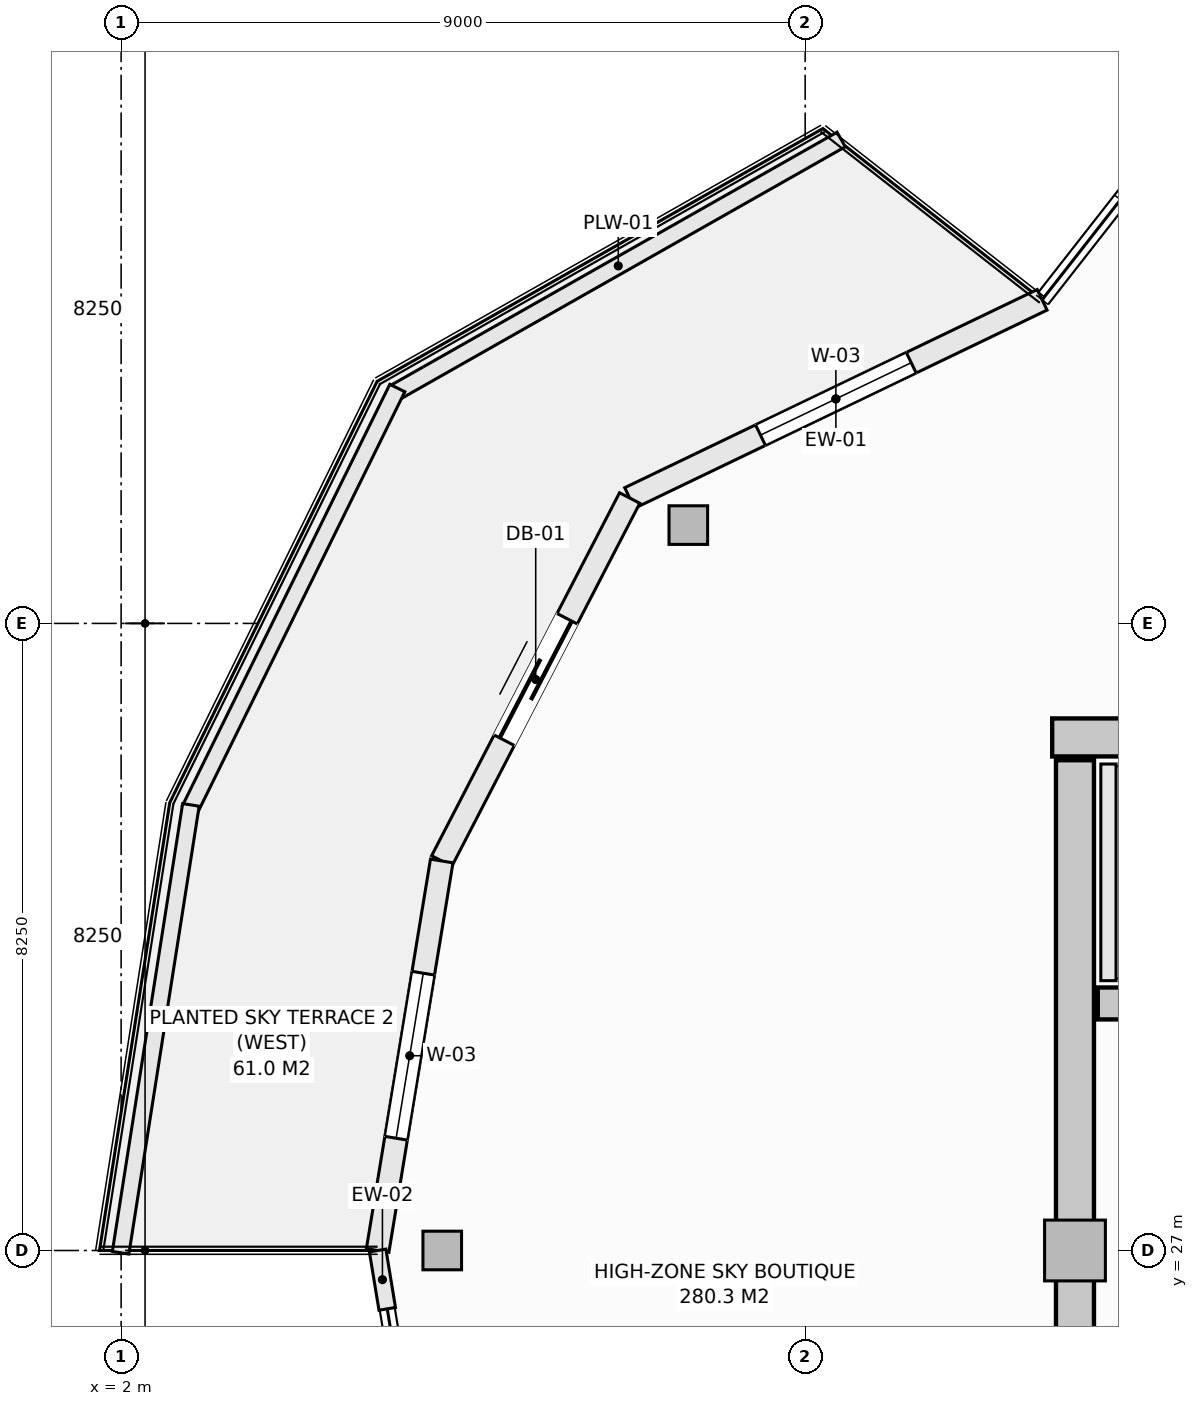
"""IFC4 building model, lengths in metres.
Left out: names, types, materials, properties, quantities, classifications, styles, units other than length and angle.
Written with IfcOpenShell. Run it as: python <this file> out.ifc"""

import sys

from ifc_helpers import new_model, si_unit, direction, frame, frame_2d, origin, origin_2d, place, context, subcontext, project, spatial, rectangle, hollow_rectangle, extrude, element, fill, save


model = new_model("IFC4")
c1 = context("Model", 3, precision=1e-05, world=origin(), true_north=direction((0.0, 1.0)))
c2 = subcontext(c1, "Body", "Model", "MODEL_VIEW")
j1 = project(units=[si_unit("LENGTHUNIT", "METRE"), si_unit("PLANEANGLEUNIT", "RADIAN")], contexts=[c1])
p1 = place(None, origin())
s1 = spatial("IfcSite", under=j1, at=p1, CompositionType="ELEMENT")
p2 = place(p1, origin())
s2 = spatial("IfcBuilding", under=s1, at=p2, CompositionType="ELEMENT")
p3 = place(p2, frame((0.0, 0.0, 191.9)))
s3 = spatial("IfcBuildingStorey", under=s2, at=p3, CompositionType="ELEMENT", Elevation=191.9)
p4 = place(p3, frame((14.25, 33.75, -0.28), z_axis=(0.0, 0.0, 1.0), x_axis=(1.0, 0.0, 0.0)))
e1 = element("IfcWall", 1, at=p4, inside=s3, PredefinedType="SHEAR", context=c2, shape_type="SweptSolid", body=[
    extrude(rectangle(XDim=13.5, YDim=0.5, at=frame_2d((6.75, 0.0))), origin(), (0.0, 0.0, 1.0), 4.51),
])
p5 = place(p3, frame((14.55, 20.55, -0.28), z_axis=(0.0, 0.0, 1.0), x_axis=(0.0, 1.0, 0.0)))
e2 = element("IfcWall", 2, at=p5, inside=s3, PredefinedType="SHEAR", context=c2, shape_type="SweptSolid", body=[
    extrude(rectangle(XDim=12.9, YDim=0.5, at=frame_2d((6.45, 0.0))), origin(), (0.0, 0.0, 1.0), 4.51),
])
p6 = place(p3, frame((14.85, 30.25, -0.28), z_axis=(0.0, 0.0, 1.0), x_axis=(1.0, 0.0, 0.0)))
e3 = element("IfcWall", 3, at=p6, inside=s3, PredefinedType="SHEAR", context=c2, shape_type="SweptSolid", body=[
    extrude(rectangle(XDim=7.3, YDim=0.42, at=frame_2d((3.65, 0.0))), origin(), (0.0, 0.0, 1.0), 4.51),
])
for number, where, z_axis, x_axis in (
    (4, (9.463, 36.544, -0.28), (0.0, 0.0, 1.0), (1.0, 0.0, 0.0)),
    (5, (6.225, 27.0, -0.28), (0.0, 0.0, 1.0), (1.0, 0.0, 0.0)),
):
    element("IfcColumn", number, at=place(p3, frame(where, z_axis=z_axis, x_axis=x_axis)), inside=s3, PredefinedType="COLUMN", context=c2, shape_type="SweptSolid", body=[
        extrude(hollow_rectangle(XDim=0.508, YDim=0.508, WallThickness=0.019, at=origin_2d()), origin(), (0.0, 0.0, 1.0), 4.51),
    ])
p7 = place(p3, frame((14.55, 27.0, -0.28), z_axis=(0.0, 0.0, 1.0), x_axis=(1.0, 0.0, 0.0)))
e6 = element("IfcColumn", 6, at=p7, inside=s3, PredefinedType="PILASTER", context=c2, shape_type="SweptSolid", body=[
    extrude(rectangle(XDim=0.8, YDim=0.8, at=origin_2d()), origin(), (0.0, 0.0, 1.0), 4.51),
])
p8 = place(p3, frame((8.691, 36.9, 0.0), z_axis=(0.0, 0.0, 1.0), x_axis=(0.901348331142, 0.433094892545, 0.0)))
e7 = element("IfcWall", 7, at=p8, inside=s3, PredefinedType="SOLIDWALL", context=c2, shape_type="SweptSolid", body=[
    extrude(rectangle(XDim=6.021, YDim=0.3, at=frame_2d((3.01, 0.0))), origin(), (0.0, 0.0, 1.0), 3.805),
])
p9 = place(p8, frame((1.91, 0.0, 0.72)))
e8 = element("IfcOpeningElement", 8, at=p9, cuts=e7, PredefinedType="OPENING", context=c2, shape_type="SweptSolid", body=[
    extrude(rectangle(XDim=2.2, YDim=1.65, at=frame_2d((1.1, 0.825))), frame((0.0, 0.16, 0.0), z_axis=(0.0, -1.0, 0.0), x_axis=(1.0, 0.0, 0.0)), (0.0, 0.0, 1.0), 0.32),
])
p10 = place(p3, frame((6.218, 32.125, 0.0), z_axis=(0.0, 0.0, 1.0), x_axis=(0.459808219482, 0.888018243786, 0.0)))
e9 = element("IfcWall", 9, at=p10, inside=s3, PredefinedType="SOLIDWALL", context=c2, shape_type="SweptSolid", body=[
    extrude(rectangle(XDim=5.378, YDim=0.3, at=frame_2d((2.689, 0.0))), origin(), (0.0, 0.0, 1.0), 3.805),
])
p11 = place(p10, frame((1.789, 0.0, 0.0)))
e10 = element("IfcOpeningElement", 10, at=p11, cuts=e9, PredefinedType="OPENING", context=c2, shape_type="SweptSolid", body=[
    extrude(rectangle(XDim=1.8, YDim=2.25, at=frame_2d((0.9, 1.125))), frame((0.0, 0.16, 0.0), z_axis=(0.0, -1.0, 0.0), x_axis=(1.0, 0.0, 0.0)), (0.0, 0.0, 1.0), 0.32),
])
p12 = place(p3, frame((5.375, 27.0, 0.0), z_axis=(0.0, 0.0, 1.0), x_axis=(0.16237087798, 0.986729799886, 0.0)))
e11 = element("IfcWall", 11, at=p12, inside=s3, PredefinedType="SOLIDWALL", context=c2, shape_type="SweptSolid", body=[
    extrude(rectangle(XDim=5.193, YDim=0.3, at=frame_2d((2.597, 0.0))), origin(), (0.0, 0.0, 1.0), 3.805),
])
p13 = place(p12, frame((1.497, 0.0, 0.72)))
e12 = element("IfcOpeningElement", 12, at=p13, cuts=e11, PredefinedType="OPENING", context=c2, shape_type="SweptSolid", body=[
    extrude(rectangle(XDim=2.2, YDim=1.65, at=frame_2d((1.1, 0.825))), frame((0.0, 0.16, 0.0), z_axis=(0.0, -1.0, 0.0), x_axis=(1.0, 0.0, 0.0)), (0.0, 0.0, 1.0), 0.32),
])
p14 = place(p3, frame((5.375, 27.0, 0.0), z_axis=(0.0, 0.0, 1.0), x_axis=(0.162261020789, -0.986747871106, 0.0)))
e13 = element("IfcWall", 13, at=p14, inside=s3, PredefinedType="SOLIDWALL", context=c2, shape_type="SweptSolid", body=[
    extrude(rectangle(XDim=0.778, YDim=0.22, at=frame_2d((0.389, 0.0))), origin(), (0.0, 0.0, 1.0), 3.805),
])
p15 = place(p3, frame((5.608, 38.291, 0.0), z_axis=(0.0, 0.0, 1.0), x_axis=(0.869860619267, 0.493297580623, 0.0)))
e14 = element("IfcWall", 14, at=p15, inside=s3, PredefinedType="PARAPET", context=c2, shape_type="SweptSolid", body=[
    extrude(rectangle(XDim=6.743, YDim=0.22, at=frame_2d((3.371, 0.0))), origin(), (0.0, 0.0, 1.0), 0.52),
])
p16 = place(p3, frame((2.906, 32.804, 0.0), z_axis=(0.0, 0.0, 1.0), x_axis=(0.441640961804, 0.897191875162, 0.0)))
e15 = element("IfcWall", 15, at=p16, inside=s3, PredefinedType="PARAPET", context=c2, shape_type="SweptSolid", body=[
    extrude(rectangle(XDim=6.178, YDim=0.22, at=frame_2d((3.089, 0.0))), origin(), (0.0, 0.0, 1.0), 0.52),
])
p17 = place(p3, frame((1.993, 26.971, 0.0), z_axis=(0.0, 0.0, 1.0), x_axis=(0.1550711793, 0.987903299595, 0.0)))
e16 = element("IfcWall", 16, at=p17, inside=s3, PredefinedType="PARAPET", context=c2, shape_type="SweptSolid", body=[
    extrude(rectangle(XDim=5.964, YDim=0.22, at=frame_2d((2.982, 0.0))), origin(), (0.0, 0.0, 1.0), 0.52),
])
p18 = place(p3, frame((14.99, 30.55, 0.0), z_axis=(0.0, 0.0, 1.0), x_axis=(0.0, 1.0, 0.0)))
e17 = element("IfcWall", 17, at=p18, inside=s3, PredefinedType="SOLIDWALL", context=c2, shape_type="SweptSolid", body=[
    extrude(rectangle(XDim=2.85, YDim=0.2, at=frame_2d((1.425, 0.0))), origin(), (0.0, 0.0, 1.0), 4.23),
])
p19 = place(p9, origin())
e18 = element("IfcWindow", 18, at=p19, inside=s3, PartitioningType="SINGLE_PANEL", PredefinedType="WINDOW", context=c2, shape_type="SweptSolid", body=[
    extrude(rectangle(XDim=2.2, YDim=1.65, at=frame_2d((1.1, 0.825))), frame((0.0, 0.03, 0.0), z_axis=(0.0, -1.0, 0.0), x_axis=(1.0, 0.0, 0.0)), (0.0, 0.0, 1.0), 0.06),
])
fill(e8, e18)
p20 = place(p11, origin())
e19 = element("IfcDoor", 19, at=p20, inside=s3, OperationType="SLIDING_TO_LEFT", PredefinedType="DOOR", context=c2, shape_type="SweptSolid", body=[
    extrude(rectangle(XDim=1.8, YDim=2.25, at=frame_2d((0.9, 1.125))), frame((0.0, 0.025, 0.0), z_axis=(0.0, -1.0, 0.0), x_axis=(1.0, 0.0, 0.0)), (0.0, 0.0, 1.0), 0.05),
])
fill(e10, e19)
p21 = place(p13, origin())
e20 = element("IfcWindow", 20, at=p21, inside=s3, PartitioningType="SINGLE_PANEL", PredefinedType="WINDOW", context=c2, shape_type="SweptSolid", body=[
    extrude(rectangle(XDim=2.2, YDim=1.65, at=frame_2d((1.1, 0.825))), frame((0.0, 0.03, 0.0), z_axis=(0.0, -1.0, 0.0), x_axis=(1.0, 0.0, 0.0)), (0.0, 0.0, 1.0), 0.06),
])
fill(e12, e20)
save(model, sys.argv[1])
